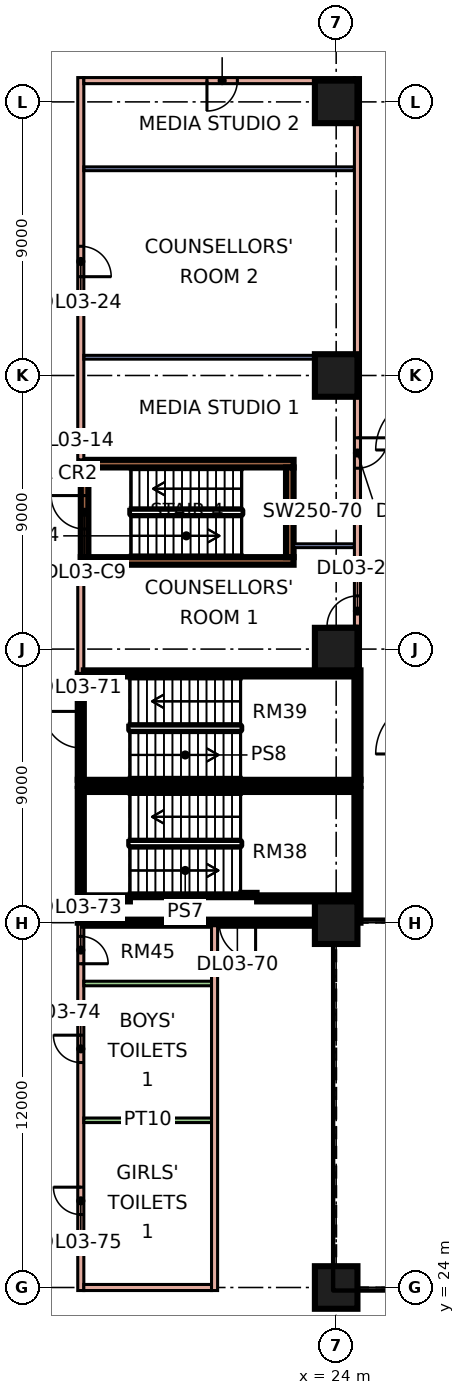
"""IFC4 building model, lengths in metres.
Left out: names, types, materials, properties, quantities, classifications, styles, units other than length and angle.
Written with IfcOpenShell. Run it as: python <this file> out.ifc"""

import sys

from ifc_helpers import new_model, si_unit, direction, frame, frame_2d, origin, origin_2d, place, context, subcontext, project, spatial, rectangle, extrude, element, fill, save


model = new_model("IFC4")
c1 = context("Model", 3, precision=1e-05, world=origin(), true_north=direction((0.0, 1.0)))
c2 = subcontext(c1, "Body", "Model", "MODEL_VIEW")
j1 = project(units=[si_unit("LENGTHUNIT", "METRE"), si_unit("PLANEANGLEUNIT", "RADIAN")], contexts=[c1])
p1 = place(None, origin())
s1 = spatial("IfcSite", under=j1, at=p1, CompositionType="ELEMENT")
p2 = place(p1, origin())
s2 = spatial("IfcBuilding", under=s1, at=p2, CompositionType="ELEMENT")
p3 = place(p2, frame((0.0, 0.0, 16.8)))
s3 = spatial("IfcBuildingStorey", under=s2, at=p3, CompositionType="ELEMENT", Elevation=16.8)
for number, where, z_axis, x_axis in (
    (1, (24.0, 24.0, 0.0), (0.0, 0.0, 1.0), (1.0, 0.0, 0.0)),
    (2, (24.0, 36.0, 0.0), (0.0, 0.0, 1.0), (1.0, 0.0, 0.0)),
    (3, (24.0, 45.0, 0.0), (0.0, 0.0, 1.0), (1.0, 0.0, 0.0)),
    (4, (24.0, 54.0, 0.0), (0.0, 0.0, 1.0), (1.0, 0.0, 0.0)),
    (5, (24.0, 63.0, 0.0), (0.0, 0.0, 1.0), (1.0, 0.0, 0.0)),
):
    element("IfcColumn", number, at=place(p3, frame(where, z_axis=z_axis, x_axis=x_axis)), inside=s3, PredefinedType="COLUMN", context=c2, shape_type="SweptSolid", body=[
        extrude(rectangle(XDim=1.4, YDim=1.4, at=origin_2d()), origin(), (0.0, 0.0, 1.0), 4.8),
    ])
for number, where, z_axis, x_axis in (
    (6, (15.6, 47.9, 0.0), (0.0, 0.0, 1.0), (1.0, 0.0, 0.0)),
    (7, (15.6, 51.1, 0.0), (0.0, 0.0, 1.0), (1.0, 0.0, 0.0)),
):
    element("IfcWall", number, at=place(p3, frame(where, z_axis=z_axis, x_axis=x_axis)), inside=s3, PredefinedType="SHEAR", context=c2, shape_type="SweptSolid", body=[
        extrude(rectangle(XDim=7.0, YDim=0.25, at=frame_2d((3.5, 0.0))), origin(), (0.0, 0.0, 1.0), 4.8),
    ])
p4 = place(p3, frame((15.725, 48.025, 0.0), z_axis=(0.0, 0.0, 1.0), x_axis=(0.0, 1.0, 0.0)))
e8 = element("IfcWall", 8, at=p4, inside=s3, PredefinedType="SHEAR", context=c2, shape_type="SweptSolid", body=[
    extrude(rectangle(XDim=2.95, YDim=0.25, at=frame_2d((1.475, 0.0))), origin(), (0.0, 0.0, 1.0), 4.8),
])
p5 = place(p4, frame((0.925, 0.0, 0.0)))
e9 = element("IfcOpeningElement", 9, at=p5, cuts=e8, PredefinedType="OPENING", context=c2, shape_type="SweptSolid", body=[
    extrude(rectangle(XDim=1.1, YDim=2.2, at=frame_2d((0.55, 1.1))), frame((0.0, 0.135, 0.0), z_axis=(0.0, -1.0, 0.0), x_axis=(1.0, 0.0, 0.0)), (0.0, 0.0, 1.0), 0.27),
])
p6 = place(p3, frame((22.475, 48.025, 0.0), z_axis=(0.0, 0.0, 1.0), x_axis=(0.0, 1.0, 0.0)))
e10 = element("IfcWall", 10, at=p6, inside=s3, PredefinedType="SHEAR", context=c2, shape_type="SweptSolid", body=[
    extrude(rectangle(XDim=2.95, YDim=0.25, at=frame_2d((1.475, 0.0))), origin(), (0.0, 0.0, 1.0), 4.8),
])
p7 = place(p3, frame((15.5, 40.6, 0.0), z_axis=(0.0, 0.0, 1.0), x_axis=(1.0, 0.0, 0.0)))
e11 = element("IfcWall", 11, at=p7, inside=s3, PredefinedType="SOLIDWALL", context=c2, shape_type="SweptSolid", body=[
    extrude(rectangle(XDim=9.3, YDim=0.2, at=frame_2d((4.65, 0.0))), origin(), (0.0, 0.0, 1.0), 4.4),
])
p8 = place(p3, frame((15.6, 23.9, 0.0), z_axis=(0.0, 0.0, 1.0), x_axis=(0.0, 1.0, 0.0)))
e12 = element("IfcWall", 12, at=p8, inside=s3, PredefinedType="PARTITIONING", context=c2, shape_type="SweptSolid", body=[
    extrude(rectangle(XDim=12.1, YDim=0.2, at=frame_2d((6.05, 0.0))), origin(), (0.0, 0.0, 1.0), 4.4),
])
p9 = place(p8, frame((10.75, 0.0, 0.0)))
e13 = element("IfcOpeningElement", 13, at=p9, cuts=e12, PredefinedType="OPENING", context=c2, shape_type="SweptSolid", body=[
    extrude(rectangle(XDim=0.9, YDim=2.1, at=frame_2d((0.45, 1.05))), frame((0.0, 0.11, 0.0), z_axis=(0.0, -1.0, 0.0), x_axis=(1.0, 0.0, 0.0)), (0.0, 0.0, 1.0), 0.22),
])
p10 = place(p8, frame((7.5, 0.0, 0.0)))
e14 = element("IfcOpeningElement", 14, at=p10, cuts=e12, PredefinedType="OPENING", context=c2, shape_type="SweptSolid", body=[
    extrude(rectangle(XDim=0.9, YDim=2.1, at=frame_2d((0.45, 1.05))), frame((0.0, 0.11, 0.0), z_axis=(0.0, -1.0, 0.0), x_axis=(1.0, 0.0, 0.0)), (0.0, 0.0, 1.0), 0.22),
])
p11 = place(p8, frame((2.5, 0.0, 0.0)))
e15 = element("IfcOpeningElement", 15, at=p11, cuts=e12, PredefinedType="OPENING", context=c2, shape_type="SweptSolid", body=[
    extrude(rectangle(XDim=0.9, YDim=2.1, at=frame_2d((0.45, 1.05))), frame((0.0, 0.11, 0.0), z_axis=(0.0, -1.0, 0.0), x_axis=(1.0, 0.0, 0.0)), (0.0, 0.0, 1.0), 0.22),
])
p12 = place(p3, frame((15.6, 36.0, 0.0), z_axis=(0.0, 0.0, 1.0), x_axis=(0.0, 1.0, 0.0)))
e16 = element("IfcWall", 16, at=p12, inside=s3, PredefinedType="SOLIDWALL", context=c2, shape_type="SweptSolid", body=[
    extrude(rectangle(XDim=4.4, YDim=0.2, at=frame_2d((2.2, 0.0))), origin(), (0.0, 0.0, 1.0), 4.4),
])
p13 = place(p3, frame((15.6, 40.7, 0.0), z_axis=(0.0, 0.0, 1.0), x_axis=(0.0, 1.0, 0.0)))
e17 = element("IfcWall", 17, at=p13, inside=s3, PredefinedType="SOLIDWALL", context=c2, shape_type="SweptSolid", body=[
    extrude(rectangle(XDim=3.5, YDim=0.2, at=frame_2d((1.75, 0.0))), origin(), (0.0, 0.0, 1.0), 4.4),
])
p14 = place(p13, frame((1.05, 0.0, 0.0)))
e18 = element("IfcOpeningElement", 18, at=p14, cuts=e17, PredefinedType="OPENING", context=c2, shape_type="SweptSolid", body=[
    extrude(rectangle(XDim=1.2, YDim=2.1, at=frame_2d((0.6, 1.05))), frame((0.0, 0.11, 0.0), z_axis=(0.0, -1.0, 0.0), x_axis=(1.0, 0.0, 0.0)), (0.0, 0.0, 1.0), 0.22),
])
p15 = place(p3, frame((15.6, 44.2, 0.0), z_axis=(0.0, 0.0, 1.0), x_axis=(0.0, 1.0, 0.0)))
e19 = element("IfcWall", 19, at=p15, inside=s3, PredefinedType="PARTITIONING", context=c2, shape_type="SweptSolid", body=[
    extrude(rectangle(XDim=3.575, YDim=0.2, at=frame_2d((1.788, 0.0))), origin(), (0.0, 0.0, 1.0), 4.4),
])
p16 = place(p3, frame((15.6, 51.225, 0.0), z_axis=(0.0, 0.0, 1.0), x_axis=(0.0, 1.0, 0.0)))
e20 = element("IfcWall", 20, at=p16, inside=s3, PredefinedType="PARTITIONING", context=c2, shape_type="SweptSolid", body=[
    extrude(rectangle(XDim=12.575, YDim=0.2, at=frame_2d((6.288, 0.0))), origin(), (0.0, 0.0, 1.0), 4.4),
])
p17 = place(p16, frame((6.025, 0.0, 0.0)))
e21 = element("IfcOpeningElement", 21, at=p17, cuts=e20, PredefinedType="OPENING", context=c2, shape_type="SweptSolid", body=[
    extrude(rectangle(XDim=1.0, YDim=2.1, at=frame_2d((0.5, 1.05))), frame((0.0, 0.11, 0.0), z_axis=(0.0, -1.0, 0.0), x_axis=(1.0, 0.0, 0.0)), (0.0, 0.0, 1.0), 0.22),
])
p18 = place(p3, frame((15.7, 24.0, 0.0), z_axis=(0.0, 0.0, 1.0), x_axis=(1.0, 0.0, 0.0)))
e22 = element("IfcWall", 22, at=p18, inside=s3, PredefinedType="PARTITIONING", context=c2, shape_type="SweptSolid", body=[
    extrude(rectangle(XDim=4.2, YDim=0.2, at=frame_2d((2.1, 0.0))), origin(), (0.0, 0.0, 1.0), 4.4),
])
for number, where, z_axis, x_axis in (
    (23, (15.7, 29.5, 0.0), (0.0, 0.0, 1.0), (1.0, 0.0, 0.0)),
    (24, (15.7, 34.0, 0.0), (0.0, 0.0, 1.0), (1.0, 0.0, 0.0)),
):
    element("IfcWall", number, at=place(p3, frame(where, z_axis=z_axis, x_axis=x_axis)), inside=s3, PredefinedType="PARTITIONING", context=c2, shape_type="SweptSolid", body=[
        extrude(rectangle(XDim=4.2, YDim=0.15, at=frame_2d((2.1, 0.0))), origin(), (0.0, 0.0, 1.0), 4.4),
    ])
p19 = place(p3, frame((15.7, 36.0, 0.0), z_axis=(0.0, 0.0, 1.0), x_axis=(1.0, 0.0, 0.0)))
e25 = element("IfcWall", 25, at=p19, inside=s3, PredefinedType="SOLIDWALL", context=c2, shape_type="SweptSolid", body=[
    extrude(rectangle(XDim=8.3, YDim=0.2, at=frame_2d((4.15, 0.0))), origin(), (0.0, 0.0, 1.0), 4.4),
])
p20 = place(p19, frame((4.45, 0.0, 0.0)))
e26 = element("IfcOpeningElement", 26, at=p20, cuts=e25, PredefinedType="OPENING", context=c2, shape_type="SweptSolid", body=[
    extrude(rectangle(XDim=1.2, YDim=2.1, at=frame_2d((0.6, 1.05))), frame((0.0, 0.11, 0.0), z_axis=(0.0, -1.0, 0.0), x_axis=(1.0, 0.0, 0.0)), (0.0, 0.0, 1.0), 0.22),
])
p21 = place(p3, frame((15.7, 44.2, 0.0), z_axis=(0.0, 0.0, 1.0), x_axis=(1.0, 0.0, 0.0)))
e27 = element("IfcWall", 27, at=p21, inside=s3, PredefinedType="SOLIDWALL", context=c2, shape_type="SweptSolid", body=[
    extrude(rectangle(XDim=8.9, YDim=0.2, at=frame_2d((4.45, 0.0))), origin(), (0.0, 0.0, 1.0), 4.4),
])
for number, where, z_axis, x_axis in (
    (28, (15.7, 54.6, 0.0), (0.0, 0.0, 1.0), (1.0, 0.0, 0.0)),
    (29, (15.7, 60.8, 0.0), (0.0, 0.0, 1.0), (1.0, 0.0, 0.0)),
):
    element("IfcWall", number, at=place(p3, frame(where, z_axis=z_axis, x_axis=x_axis)), inside=s3, PredefinedType="PARTITIONING", context=c2, shape_type="SweptSolid", body=[
        extrude(rectangle(XDim=8.9, YDim=0.125, at=frame_2d((4.45, 0.0))), origin(), (0.0, 0.0, 1.0), 4.4),
    ])
p22 = place(p3, frame((15.7, 63.7, 0.0), z_axis=(0.0, 0.0, 1.0), x_axis=(1.0, 0.0, 0.0)))
e30 = element("IfcWall", 30, at=p22, inside=s3, PredefinedType="PARTITIONING", context=c2, shape_type="SweptSolid", body=[
    extrude(rectangle(XDim=8.9, YDim=0.2, at=frame_2d((4.45, 0.0))), origin(), (0.0, 0.0, 1.0), 4.4),
])
p23 = place(p22, frame((4.05, 0.0, 0.0)))
e31 = element("IfcOpeningElement", 31, at=p23, cuts=e30, PredefinedType="OPENING", context=c2, shape_type="SweptSolid", body=[
    extrude(rectangle(XDim=1.0, YDim=2.1, at=frame_2d((0.5, 1.05))), frame((0.0, 0.11, 0.0), z_axis=(0.0, -1.0, 0.0), x_axis=(1.0, 0.0, 0.0)), (0.0, 0.0, 1.0), 0.22),
])
p24 = place(p3, frame((20.0, 23.9, 0.0), z_axis=(0.0, 0.0, 1.0), x_axis=(0.0, 1.0, 0.0)))
e32 = element("IfcWall", 32, at=p24, inside=s3, PredefinedType="PARTITIONING", context=c2, shape_type="SweptSolid", body=[
    extrude(rectangle(XDim=12.0, YDim=0.2, at=frame_2d((6.0, 0.0))), origin(), (0.0, 0.0, 1.0), 4.4),
])
p25 = place(p3, frame((22.6, 48.4, 0.0), z_axis=(0.0, 0.0, 1.0), x_axis=(1.0, 0.0, 0.0)))
e33 = element("IfcWall", 33, at=p25, inside=s3, PredefinedType="PARTITIONING", context=c2, shape_type="SweptSolid", body=[
    extrude(rectangle(XDim=2.0, YDim=0.125, at=frame_2d((1.0, 0.0))), origin(), (0.0, 0.0, 1.0), 4.4),
])
p26 = place(p3, frame((24.7, 36.0, 0.0), z_axis=(0.0, 0.0, 1.0), x_axis=(0.0, 1.0, 0.0)))
e34 = element("IfcWall", 34, at=p26, inside=s3, PredefinedType="SOLIDWALL", context=c2, shape_type="SweptSolid", body=[
    extrude(rectangle(XDim=4.4, YDim=0.2, at=frame_2d((2.2, 0.0))), origin(), (0.0, 0.0, 1.0), 4.4),
])
p27 = place(p3, frame((24.7, 40.7, 0.0), z_axis=(0.0, 0.0, 1.0), x_axis=(0.0, 1.0, 0.0)))
e35 = element("IfcWall", 35, at=p27, inside=s3, PredefinedType="SOLIDWALL", context=c2, shape_type="SweptSolid", body=[
    extrude(rectangle(XDim=3.6, YDim=0.2, at=frame_2d((1.8, 0.0))), origin(), (0.0, 0.0, 1.0), 4.4),
])
p28 = place(p3, frame((24.7, 44.3, 0.0), z_axis=(0.0, 0.0, 1.0), x_axis=(0.0, 1.0, 0.0)))
e36 = element("IfcWall", 36, at=p28, inside=s3, PredefinedType="PARTITIONING", context=c2, shape_type="SweptSolid", body=[
    extrude(rectangle(XDim=19.5, YDim=0.2, at=frame_2d((9.75, 0.0))), origin(), (0.0, 0.0, 1.0), 4.4),
])
p29 = place(p28, frame((1.45, 0.0, 0.0)))
e37 = element("IfcOpeningElement", 37, at=p29, cuts=e36, PredefinedType="OPENING", context=c2, shape_type="SweptSolid", body=[
    extrude(rectangle(XDim=1.0, YDim=2.1, at=frame_2d((0.5, 1.05))), frame((0.0, 0.11, 0.0), z_axis=(0.0, -1.0, 0.0), x_axis=(1.0, 0.0, 0.0)), (0.0, 0.0, 1.0), 0.22),
])
p30 = place(p28, frame((6.65, 0.0, 0.0)))
e38 = element("IfcOpeningElement", 38, at=p30, cuts=e36, PredefinedType="OPENING", context=c2, shape_type="SweptSolid", body=[
    extrude(rectangle(XDim=1.0, YDim=2.1, at=frame_2d((0.5, 1.05))), frame((0.0, 0.11, 0.0), z_axis=(0.0, -1.0, 0.0), x_axis=(1.0, 0.0, 0.0)), (0.0, 0.0, 1.0), 0.22),
])
p31 = place(p3, frame((21.4, 36.8, 0.0), z_axis=(0.0, 0.0, 1.0), x_axis=(1.0, 0.0, 0.0)))
e39 = element("IfcWall", 39, at=p31, inside=s3, PredefinedType="SOLIDWALL", context=c2, shape_type="SweptSolid", body=[
    extrude(rectangle(XDim=3.2, YDim=0.2, at=frame_2d((1.6, 0.0))), origin(), (0.0, 0.0, 1.0), 4.4),
])
p32 = place(p3, frame((20.855, 40.4, 0.0), z_axis=(0.0, 0.0, 1.0), x_axis=(1.0, 0.0, 0.0)))
e40 = element("IfcWall", 40, at=p32, inside=s3, PredefinedType="SOLIDWALL", context=c2, shape_type="SweptSolid", body=[
    extrude(rectangle(XDim=3.745, YDim=0.2, at=frame_2d((1.873, 0.0))), origin(), (0.0, 0.0, 1.0), 4.4),
])
for number, where, z_axis, x_axis in (
    (41, (15.7, 36.8, 0.0), (0.0, 0.0, 1.0), (1.0, 0.0, 0.0)),
    (42, (15.7, 40.4, 0.0), (0.0, 0.0, 1.0), (1.0, 0.0, 0.0)),
):
    element("IfcWall", number, at=place(p3, frame(where, z_axis=z_axis, x_axis=x_axis)), inside=s3, PredefinedType="SOLIDWALL", context=c2, shape_type="SweptSolid", body=[
        extrude(rectangle(XDim=1.515, YDim=0.2, at=frame_2d((0.758, 0.0))), origin(), (0.0, 0.0, 1.0), 4.4),
    ])
p33 = place(p5, frame((1.1, 0.0, 0.0), z_axis=(0.0, 0.0, 1.0), x_axis=(-1.0, 0.0, 0.0)))
e43 = element("IfcDoor", 43, at=p33, inside=s3, OperationType="SINGLE_SWING_RIGHT", PredefinedType="DOOR", context=c2, shape_type="SweptSolid", body=[
    extrude(rectangle(XDim=1.1, YDim=2.2, at=frame_2d((0.55, 1.1))), frame((0.0, 0.025, 0.0), z_axis=(0.0, -1.0, 0.0), x_axis=(1.0, 0.0, 0.0)), (0.0, 0.0, 1.0), 0.05),
])
fill(e9, e43)
p34 = place(p29, origin())
e44 = element("IfcDoor", 44, at=p34, inside=s3, OperationType="SINGLE_SWING_LEFT", PredefinedType="DOOR", context=c2, shape_type="SweptSolid", body=[
    extrude(rectangle(XDim=1.0, YDim=2.1, at=frame_2d((0.5, 1.05))), frame((0.0, 0.025, 0.0), z_axis=(0.0, -1.0, 0.0), x_axis=(1.0, 0.0, 0.0)), (0.0, 0.0, 1.0), 0.05),
])
fill(e37, e44)
p35 = place(p30, origin())
e45 = element("IfcDoor", 45, at=p35, inside=s3, OperationType="SINGLE_SWING_RIGHT", PredefinedType="DOOR", context=c2, shape_type="SweptSolid", body=[
    extrude(rectangle(XDim=1.0, YDim=2.1, at=frame_2d((0.5, 1.05))), frame((0.0, 0.025, 0.0), z_axis=(0.0, -1.0, 0.0), x_axis=(1.0, 0.0, 0.0)), (0.0, 0.0, 1.0), 0.05),
])
fill(e38, e45)
p36 = place(p17, frame((1.0, 0.0, 0.0), z_axis=(0.0, 0.0, 1.0), x_axis=(-1.0, 0.0, 0.0)))
e46 = element("IfcDoor", 46, at=p36, inside=s3, OperationType="SINGLE_SWING_LEFT", PredefinedType="DOOR", context=c2, shape_type="SweptSolid", body=[
    extrude(rectangle(XDim=1.0, YDim=2.1, at=frame_2d((0.5, 1.05))), frame((0.0, 0.025, 0.0), z_axis=(0.0, -1.0, 0.0), x_axis=(1.0, 0.0, 0.0)), (0.0, 0.0, 1.0), 0.05),
])
fill(e21, e46)
p37 = place(p23, frame((1.0, 0.0, 0.0), z_axis=(0.0, 0.0, 1.0), x_axis=(-1.0, 0.0, 0.0)))
e47 = element("IfcDoor", 47, at=p37, inside=s3, OperationType="SINGLE_SWING_LEFT", PredefinedType="DOOR", context=c2, shape_type="SweptSolid", body=[
    extrude(rectangle(XDim=1.0, YDim=2.1, at=frame_2d((0.5, 1.05))), frame((0.0, 0.025, 0.0), z_axis=(0.0, -1.0, 0.0), x_axis=(1.0, 0.0, 0.0)), (0.0, 0.0, 1.0), 0.05),
])
fill(e31, e47)
p38 = place(p20, origin())
e48 = element("IfcDoor", 48, at=p38, inside=s3, OperationType="SINGLE_SWING_RIGHT", PredefinedType="DOOR", context=c2, shape_type="SweptSolid", body=[
    extrude(rectangle(XDim=1.2, YDim=2.1, at=frame_2d((0.6, 1.05))), frame((0.0, 0.025, 0.0), z_axis=(0.0, -1.0, 0.0), x_axis=(1.0, 0.0, 0.0)), (0.0, 0.0, 1.0), 0.05),
])
fill(e26, e48)
p39 = place(p14, frame((1.2, 0.0, 0.0), z_axis=(0.0, 0.0, 1.0), x_axis=(-1.0, 0.0, 0.0)))
e49 = element("IfcDoor", 49, at=p39, inside=s3, OperationType="SINGLE_SWING_RIGHT", PredefinedType="DOOR", context=c2, shape_type="SweptSolid", body=[
    extrude(rectangle(XDim=1.2, YDim=2.1, at=frame_2d((0.6, 1.05))), frame((0.0, 0.025, 0.0), z_axis=(0.0, -1.0, 0.0), x_axis=(1.0, 0.0, 0.0)), (0.0, 0.0, 1.0), 0.05),
])
fill(e18, e49)
p40 = place(p9, frame((0.9, 0.0, 0.0), z_axis=(0.0, 0.0, 1.0), x_axis=(-1.0, 0.0, 0.0)))
e50 = element("IfcDoor", 50, at=p40, inside=s3, OperationType="SINGLE_SWING_LEFT", PredefinedType="DOOR", context=c2, shape_type="SweptSolid", body=[
    extrude(rectangle(XDim=0.9, YDim=2.1, at=frame_2d((0.45, 1.05))), frame((0.0, 0.025, 0.0), z_axis=(0.0, -1.0, 0.0), x_axis=(1.0, 0.0, 0.0)), (0.0, 0.0, 1.0), 0.05),
])
fill(e13, e50)
p41 = place(p10, frame((0.9, 0.0, 0.0), z_axis=(0.0, 0.0, 1.0), x_axis=(-1.0, 0.0, 0.0)))
e51 = element("IfcDoor", 51, at=p41, inside=s3, OperationType="SINGLE_SWING_RIGHT", PredefinedType="DOOR", context=c2, shape_type="SweptSolid", body=[
    extrude(rectangle(XDim=0.9, YDim=2.1, at=frame_2d((0.45, 1.05))), frame((0.0, 0.025, 0.0), z_axis=(0.0, -1.0, 0.0), x_axis=(1.0, 0.0, 0.0)), (0.0, 0.0, 1.0), 0.05),
])
fill(e14, e51)
p42 = place(p11, frame((0.9, 0.0, 0.0), z_axis=(0.0, 0.0, 1.0), x_axis=(-1.0, 0.0, 0.0)))
e52 = element("IfcDoor", 52, at=p42, inside=s3, OperationType="SINGLE_SWING_RIGHT", PredefinedType="DOOR", context=c2, shape_type="SweptSolid", body=[
    extrude(rectangle(XDim=0.9, YDim=2.1, at=frame_2d((0.45, 1.05))), frame((0.0, 0.025, 0.0), z_axis=(0.0, -1.0, 0.0), x_axis=(1.0, 0.0, 0.0)), (0.0, 0.0, 1.0), 0.05),
])
fill(e15, e52)
save(model, sys.argv[1])
